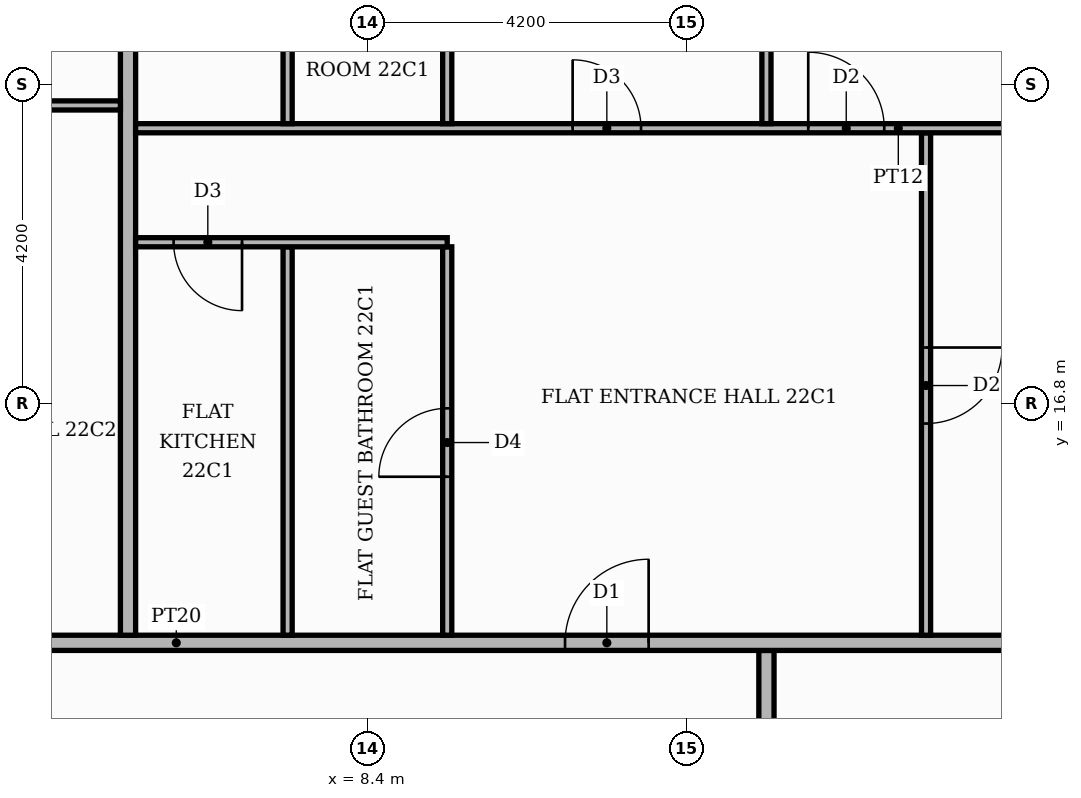
"""IFC4 building model, lengths in metres.
Left out: names, types, materials, properties, quantities, classifications, styles, units other than length and angle.
Written with IfcOpenShell. Run it as: python <this file> out.ifc"""

import sys

from ifc_helpers import new_model, si_unit, direction, frame, frame_2d, origin, place, context, subcontext, project, spatial, rectangle, extrude, element, fill, save


model = new_model("IFC4")
c1 = context("Model", 3, precision=1e-05, world=origin(), true_north=direction((0.0, 1.0)))
c2 = subcontext(c1, "Body", "Model", "MODEL_VIEW")
j1 = project(units=[si_unit("LENGTHUNIT", "METRE"), si_unit("PLANEANGLEUNIT", "RADIAN")], contexts=[c1])
p1 = place(None, origin())
s1 = spatial("IfcSite", under=j1, at=p1, CompositionType="ELEMENT")
p2 = place(p1, origin())
s2 = spatial("IfcBuilding", under=s1, at=p2, CompositionType="ELEMENT")
p3 = place(p2, frame((0.0, 0.0, 94.8)))
s3 = spatial("IfcBuildingStorey", under=s2, at=p3, CompositionType="ELEMENT", Elevation=94.8)
p4 = place(p3, frame((13.65, -5.15, 0.0), z_axis=(0.0, 0.0, 1.0), x_axis=(0.0, 1.0, 0.0)))
e1 = element("IfcWall", 1, at=p4, inside=s3, PredefinedType="PARTITIONING", context=c2, shape_type="SweptSolid", body=[
    extrude(rectangle(XDim=18.7, YDim=0.2, at=frame_2d((9.35, 0.0))), origin(), (0.0, 0.0, 1.0), 3.48),
])
p5 = place(p4, frame((1.45, 0.0, 0.0)))
e2 = element("IfcOpeningElement", 2, at=p5, cuts=e1, PredefinedType="OPENING", context=c2, shape_type="SweptSolid", body=[
    extrude(rectangle(XDim=1.1, YDim=2.4, at=frame_2d((0.55, 1.2))), frame((0.0, 0.11, 0.0), z_axis=(0.0, -1.0, 0.0), x_axis=(1.0, 0.0, 0.0)), (0.0, 0.0, 1.0), 0.22),
])
p6 = place(p3, frame((-13.65, 13.65, 0.0), z_axis=(0.0, 0.0, 1.0), x_axis=(1.0, 0.0, 0.0)))
e3 = element("IfcWall", 3, at=p6, inside=s3, PredefinedType="PARTITIONING", context=c2, shape_type="SweptSolid", body=[
    extrude(rectangle(XDim=39.07, YDim=0.2, at=frame_2d((19.535, 0.0))), origin(), (0.0, 0.0, 1.0), 3.48),
])
p7 = place(p6, frame((24.65, 0.0, 0.0)))
e4 = element("IfcOpeningElement", 4, at=p7, cuts=e3, PredefinedType="OPENING", context=c2, shape_type="SweptSolid", body=[
    extrude(rectangle(XDim=1.1, YDim=2.4, at=frame_2d((0.55, 1.2))), frame((0.0, 0.11, 0.0), z_axis=(0.0, -1.0, 0.0), x_axis=(1.0, 0.0, 0.0)), (0.0, 0.0, 1.0), 0.22),
])
p8 = place(p6, frame((16.25, 0.0, 0.0)))
e5 = element("IfcOpeningElement", 5, at=p8, cuts=e3, PredefinedType="OPENING", context=c2, shape_type="SweptSolid", body=[
    extrude(rectangle(XDim=1.1, YDim=2.4, at=frame_2d((0.55, 1.2))), frame((0.0, 0.11, 0.0), z_axis=(0.0, -1.0, 0.0), x_axis=(1.0, 0.0, 0.0)), (0.0, 0.0, 1.0), 0.22),
])
p9 = place(p3, frame((5.25, 13.75, 0.0), z_axis=(0.0, 0.0, 1.0), x_axis=(0.0, 1.0, 0.0)))
e6 = element("IfcWall", 6, at=p9, inside=s3, PredefinedType="PARTITIONING", context=c2, shape_type="SweptSolid", body=[
    extrude(rectangle(XDim=11.67, YDim=0.2, at=frame_2d((5.835, 0.0))), origin(), (0.0, 0.0, 1.0), 3.48),
])
p10 = place(p3, frame((7.35, 13.75, 0.0), z_axis=(0.0, 0.0, 1.0), x_axis=(0.0, 1.0, 0.0)))
e7 = element("IfcWall", 7, at=p10, inside=s3, PredefinedType="PARTITIONING", context=c2, shape_type="SweptSolid", body=[
    extrude(rectangle(XDim=5.11, YDim=0.12, at=frame_2d((2.555, 0.0))), origin(), (0.0, 0.0, 1.0), 3.48),
])
p11 = place(p3, frame((9.45, 13.75, 0.0), z_axis=(0.0, 0.0, 1.0), x_axis=(0.0, 1.0, 0.0)))
e8 = element("IfcWall", 8, at=p11, inside=s3, PredefinedType="PARTITIONING", context=c2, shape_type="SweptSolid", body=[
    extrude(rectangle(XDim=5.11, YDim=0.12, at=frame_2d((2.555, 0.0))), origin(), (0.0, 0.0, 1.0), 3.48),
])
p12 = place(p11, frame((2.085, 0.0, 0.0)))
e9 = element("IfcOpeningElement", 9, at=p12, cuts=e8, PredefinedType="OPENING", context=c2, shape_type="SweptSolid", body=[
    extrude(rectangle(XDim=0.9, YDim=2.1, at=frame_2d((0.45, 1.05))), frame((0.0, 0.07, 0.0), z_axis=(0.0, -1.0, 0.0), x_axis=(1.0, 0.0, 0.0)), (0.0, 0.0, 1.0), 0.14),
])
p13 = place(p3, frame((15.75, 13.75, 0.0), z_axis=(0.0, 0.0, 1.0), x_axis=(0.0, 1.0, 0.0)))
e10 = element("IfcWall", 10, at=p13, inside=s3, PredefinedType="PARTITIONING", context=c2, shape_type="SweptSolid", body=[
    extrude(rectangle(XDim=6.61, YDim=0.12, at=frame_2d((3.305, 0.0))), origin(), (0.0, 0.0, 1.0), 3.48),
])
p14 = place(p13, frame((2.785, 0.0, 0.0)))
e11 = element("IfcOpeningElement", 11, at=p14, cuts=e10, PredefinedType="OPENING", context=c2, shape_type="SweptSolid", body=[
    extrude(rectangle(XDim=1.0, YDim=2.1, at=frame_2d((0.5, 1.05))), frame((0.0, 0.07, 0.0), z_axis=(0.0, -1.0, 0.0), x_axis=(1.0, 0.0, 0.0)), (0.0, 0.0, 1.0), 0.14),
])
p15 = place(p3, frame((5.35, 18.92, 0.0), z_axis=(0.0, 0.0, 1.0), x_axis=(1.0, 0.0, 0.0)))
e12 = element("IfcWall", 12, at=p15, inside=s3, PredefinedType="PARTITIONING", context=c2, shape_type="SweptSolid", body=[
    extrude(rectangle(XDim=4.1, YDim=0.12, at=frame_2d((2.05, 0.0))), origin(), (0.0, 0.0, 1.0), 3.48),
])
p16 = place(p15, frame((0.5, 0.0, 0.0)))
e13 = element("IfcOpeningElement", 13, at=p16, cuts=e12, PredefinedType="OPENING", context=c2, shape_type="SweptSolid", body=[
    extrude(rectangle(XDim=0.9, YDim=2.1, at=frame_2d((0.45, 1.05))), frame((0.0, 0.07, 0.0), z_axis=(0.0, -1.0, 0.0), x_axis=(1.0, 0.0, 0.0)), (0.0, 0.0, 1.0), 0.14),
])
p17 = place(p3, frame((5.35, 20.42, 0.0), z_axis=(0.0, 0.0, 1.0), x_axis=(1.0, 0.0, 0.0)))
e14 = element("IfcWall", 14, at=p17, inside=s3, PredefinedType="PARTITIONING", context=c2, shape_type="SweptSolid", body=[
    extrude(rectangle(XDim=20.07, YDim=0.12, at=frame_2d((10.035, 0.0))), origin(), (0.0, 0.0, 1.0), 3.48),
])
p18 = place(p17, frame((8.85, 0.0, 0.0)))
e15 = element("IfcOpeningElement", 15, at=p18, cuts=e14, PredefinedType="OPENING", context=c2, shape_type="SweptSolid", body=[
    extrude(rectangle(XDim=1.0, YDim=2.1, at=frame_2d((0.5, 1.05))), frame((0.0, 0.07, 0.0), z_axis=(0.0, -1.0, 0.0), x_axis=(1.0, 0.0, 0.0)), (0.0, 0.0, 1.0), 0.14),
])
p19 = place(p17, frame((5.75, 0.0, 0.0)))
e16 = element("IfcOpeningElement", 16, at=p19, cuts=e14, PredefinedType="OPENING", context=c2, shape_type="SweptSolid", body=[
    extrude(rectangle(XDim=0.9, YDim=2.1, at=frame_2d((0.45, 1.05))), frame((0.0, 0.07, 0.0), z_axis=(0.0, -1.0, 0.0), x_axis=(1.0, 0.0, 0.0)), (0.0, 0.0, 1.0), 0.14),
])
p20 = place(p3, frame((7.35, 20.48, 0.0), z_axis=(0.0, 0.0, 1.0), x_axis=(0.0, 1.0, 0.0)))
e17 = element("IfcWall", 17, at=p20, inside=s3, PredefinedType="PARTITIONING", context=c2, shape_type="SweptSolid", body=[
    extrude(rectangle(XDim=4.94, YDim=0.12, at=frame_2d((2.47, 0.0))), origin(), (0.0, 0.0, 1.0), 3.48),
])
p21 = place(p20, frame((2.14, 0.0, 0.0)))
e18 = element("IfcOpeningElement", 18, at=p21, cuts=e17, PredefinedType="OPENING", context=c2, shape_type="SweptSolid", body=[
    extrude(rectangle(XDim=0.9, YDim=2.1, at=frame_2d((0.45, 1.05))), frame((0.0, 0.07, 0.0), z_axis=(0.0, -1.0, 0.0), x_axis=(1.0, 0.0, 0.0)), (0.0, 0.0, 1.0), 0.14),
])
p22 = place(p3, frame((9.45, 20.48, 0.0), z_axis=(0.0, 0.0, 1.0), x_axis=(0.0, 1.0, 0.0)))
e19 = element("IfcWall", 19, at=p22, inside=s3, PredefinedType="PARTITIONING", context=c2, shape_type="SweptSolid", body=[
    extrude(rectangle(XDim=4.94, YDim=0.12, at=frame_2d((2.47, 0.0))), origin(), (0.0, 0.0, 1.0), 3.48),
])
p23 = place(p22, frame((2.14, 0.0, 0.0)))
e20 = element("IfcOpeningElement", 20, at=p23, cuts=e19, PredefinedType="OPENING", context=c2, shape_type="SweptSolid", body=[
    extrude(rectangle(XDim=0.9, YDim=2.1, at=frame_2d((0.45, 1.05))), frame((0.0, 0.07, 0.0), z_axis=(0.0, -1.0, 0.0), x_axis=(1.0, 0.0, 0.0)), (0.0, 0.0, 1.0), 0.14),
])
p24 = place(p3, frame((13.65, 20.48, 0.0), z_axis=(0.0, 0.0, 1.0), x_axis=(0.0, 1.0, 0.0)))
e21 = element("IfcWall", 21, at=p24, inside=s3, PredefinedType="PARTITIONING", context=c2, shape_type="SweptSolid", body=[
    extrude(rectangle(XDim=4.94, YDim=0.12, at=frame_2d((2.47, 0.0))), origin(), (0.0, 0.0, 1.0), 3.48),
])
p25 = place(p3, frame((-13.55, 20.72, 0.0), z_axis=(0.0, 0.0, 1.0), x_axis=(1.0, 0.0, 0.0)))
e22 = element("IfcWall", 22, at=p25, inside=s3, PredefinedType="PARTITIONING", context=c2, shape_type="SweptSolid", body=[
    extrude(rectangle(XDim=18.7, YDim=0.12, at=frame_2d((9.35, 0.0))), origin(), (0.0, 0.0, 1.0), 3.48),
])
p26 = place(p25, frame((15.15, 0.0, 0.0)))
e23 = element("IfcOpeningElement", 23, at=p26, cuts=e22, PredefinedType="OPENING", context=c2, shape_type="SweptSolid", body=[
    extrude(rectangle(XDim=1.0, YDim=2.1, at=frame_2d((0.5, 1.05))), frame((0.0, 0.07, 0.0), z_axis=(0.0, -1.0, 0.0), x_axis=(1.0, 0.0, 0.0)), (0.0, 0.0, 1.0), 0.14),
])
p27 = place(p25, frame((9.95, 0.0, 0.0)))
e24 = element("IfcOpeningElement", 24, at=p27, cuts=e22, PredefinedType="OPENING", context=c2, shape_type="SweptSolid", body=[
    extrude(rectangle(XDim=0.9, YDim=2.1, at=frame_2d((0.45, 1.05))), frame((0.0, 0.07, 0.0), z_axis=(0.0, -1.0, 0.0), x_axis=(1.0, 0.0, 0.0)), (0.0, 0.0, 1.0), 0.14),
])
p28 = place(p25, frame((1.55, 0.0, 0.0)))
e25 = element("IfcOpeningElement", 25, at=p28, cuts=e22, PredefinedType="OPENING", context=c2, shape_type="SweptSolid", body=[
    extrude(rectangle(XDim=0.9, YDim=2.1, at=frame_2d((0.45, 1.05))), frame((0.0, 0.07, 0.0), z_axis=(0.0, -1.0, 0.0), x_axis=(1.0, 0.0, 0.0)), (0.0, 0.0, 1.0), 0.14),
])
p29 = place(p7, origin())
e26 = element("IfcDoor", 26, at=p29, inside=s3, OperationType="SINGLE_SWING_RIGHT", PredefinedType="DOOR", context=c2, shape_type="SweptSolid", body=[
    extrude(rectangle(XDim=1.1, YDim=2.4, at=frame_2d((0.55, 1.2))), frame((0.0, 0.025, 0.0), z_axis=(0.0, -1.0, 0.0), x_axis=(1.0, 0.0, 0.0)), (0.0, 0.0, 1.0), 0.05),
])
fill(e4, e26)
p30 = place(p14, frame((1.0, 0.0, 0.0), z_axis=(0.0, 0.0, 1.0), x_axis=(-1.0, 0.0, 0.0)))
e27 = element("IfcDoor", 27, at=p30, inside=s3, OperationType="SINGLE_SWING_RIGHT", PredefinedType="DOOR", context=c2, shape_type="SweptSolid", body=[
    extrude(rectangle(XDim=1.0, YDim=2.1, at=frame_2d((0.5, 1.05))), frame((0.0, 0.025, 0.0), z_axis=(0.0, -1.0, 0.0), x_axis=(1.0, 0.0, 0.0)), (0.0, 0.0, 1.0), 0.05),
])
fill(e11, e27)
p31 = place(p12, origin())
e28 = element("IfcDoor", 28, at=p31, inside=s3, OperationType="SINGLE_SWING_LEFT", PredefinedType="DOOR", context=c2, shape_type="SweptSolid", body=[
    extrude(rectangle(XDim=0.9, YDim=2.1, at=frame_2d((0.45, 1.05))), frame((0.0, 0.025, 0.0), z_axis=(0.0, -1.0, 0.0), x_axis=(1.0, 0.0, 0.0)), (0.0, 0.0, 1.0), 0.05),
])
fill(e9, e28)
p32 = place(p16, frame((0.9, 0.0, 0.0), z_axis=(0.0, 0.0, 1.0), x_axis=(-1.0, 0.0, 0.0)))
e29 = element("IfcDoor", 29, at=p32, inside=s3, OperationType="SINGLE_SWING_RIGHT", PredefinedType="DOOR", context=c2, shape_type="SweptSolid", body=[
    extrude(rectangle(XDim=0.9, YDim=2.1, at=frame_2d((0.45, 1.05))), frame((0.0, 0.025, 0.0), z_axis=(0.0, -1.0, 0.0), x_axis=(1.0, 0.0, 0.0)), (0.0, 0.0, 1.0), 0.05),
])
fill(e13, e29)
p33 = place(p18, origin())
e30 = element("IfcDoor", 30, at=p33, inside=s3, OperationType="SINGLE_SWING_LEFT", PredefinedType="DOOR", context=c2, shape_type="SweptSolid", body=[
    extrude(rectangle(XDim=1.0, YDim=2.1, at=frame_2d((0.5, 1.05))), frame((0.0, 0.025, 0.0), z_axis=(0.0, -1.0, 0.0), x_axis=(1.0, 0.0, 0.0)), (0.0, 0.0, 1.0), 0.05),
])
fill(e15, e30)
p34 = place(p19, origin())
e31 = element("IfcDoor", 31, at=p34, inside=s3, OperationType="SINGLE_SWING_LEFT", PredefinedType="DOOR", context=c2, shape_type="SweptSolid", body=[
    extrude(rectangle(XDim=0.9, YDim=2.1, at=frame_2d((0.45, 1.05))), frame((0.0, 0.025, 0.0), z_axis=(0.0, -1.0, 0.0), x_axis=(1.0, 0.0, 0.0)), (0.0, 0.0, 1.0), 0.05),
])
fill(e16, e31)
save(model, sys.argv[1])
